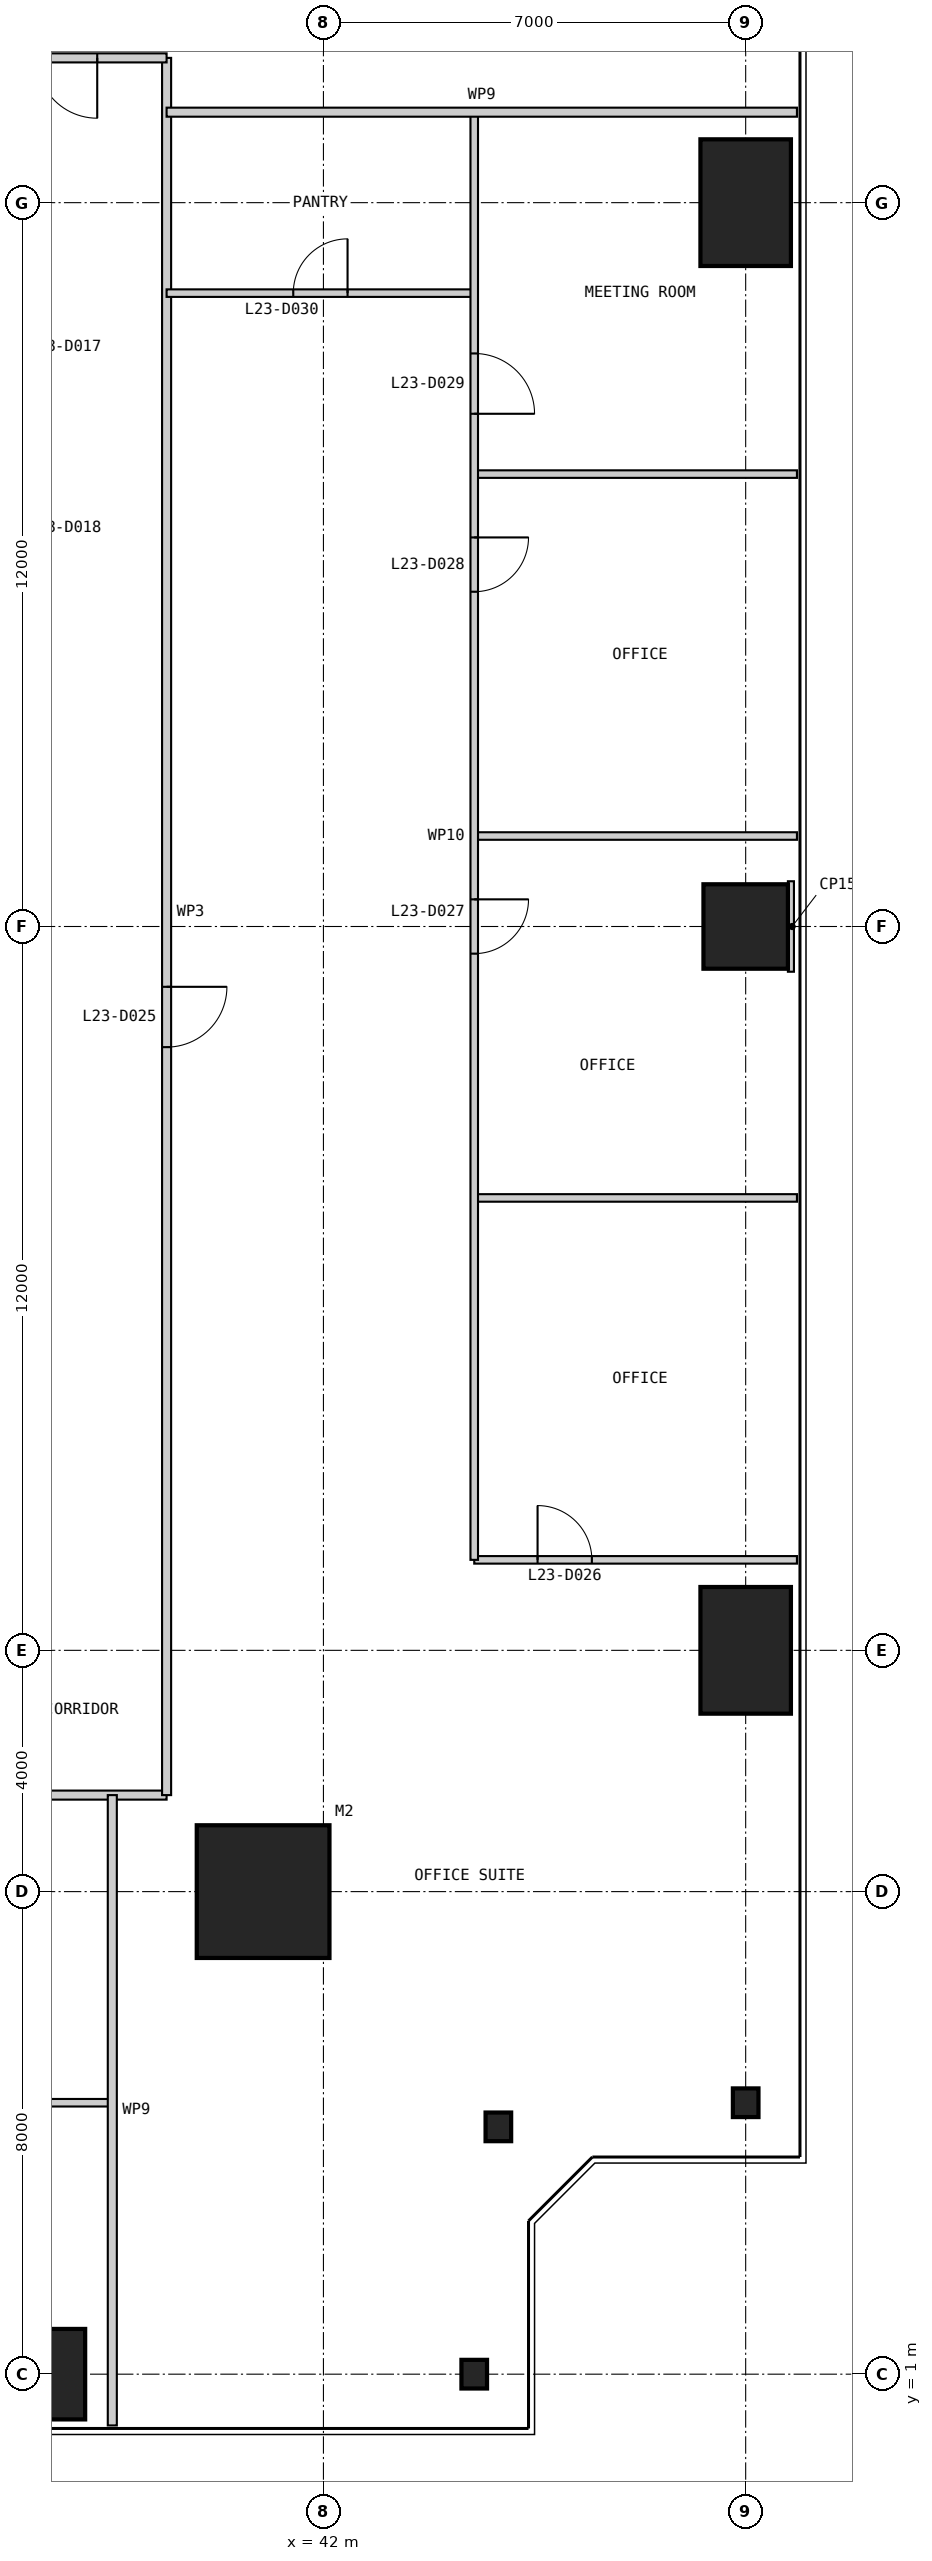
"""IFC4 building model, lengths in metres.
Left out: names, types, materials, properties, quantities, classifications, styles, units other than length and angle.
Written with IfcOpenShell. Run it as: python <this file> out.ifc"""

import sys

from ifc_helpers import new_model, si_unit, direction, frame, frame_2d, origin, origin_2d, place, context, subcontext, project, spatial, rectangle, i_section, extrude, element, fill, save


model = new_model("IFC4")
c1 = context("Model", 3, precision=1e-05, world=origin(), true_north=direction((0.0, 1.0)))
c2 = subcontext(c1, "Body", "Model", "MODEL_VIEW")
j1 = project(units=[si_unit("LENGTHUNIT", "METRE"), si_unit("PLANEANGLEUNIT", "RADIAN")], contexts=[c1])
p1 = place(None, origin())
s1 = spatial("IfcSite", under=j1, at=p1, CompositionType="ELEMENT")
p2 = place(p1, origin())
s2 = spatial("IfcBuilding", under=s1, at=p2, CompositionType="ELEMENT")
p3 = place(p2, frame((0.0, 0.0, 102.4)))
s3 = spatial("IfcBuildingStorey", under=s2, at=p3, CompositionType="ELEMENT", Elevation=102.4)
p4 = place(p3, frame((41.0, 9.0, 0.0), z_axis=(0.0, 0.0, 1.0), x_axis=(1.0, 0.0, 0.0)))
e1 = element("IfcColumn", 1, at=p4, inside=s3, PredefinedType="COLUMN", context=c2, shape_type="SweptSolid", body=[
    extrude(rectangle(XDim=2.2, YDim=2.2, at=origin_2d()), origin(), (0.0, 0.0, 1.0), 4.0),
])
p5 = place(p3, frame((37.0, 1.0, 0.0), z_axis=(0.0, 0.0, 1.0), x_axis=(1.0, 0.0, 0.0)))
e2 = element("IfcColumn", 2, at=p5, inside=s3, PredefinedType="COLUMN", context=c2, shape_type="SweptSolid", body=[
    extrude(rectangle(XDim=2.1, YDim=1.5, at=origin_2d()), origin(), (0.0, 0.0, 1.0), 4.0),
])
for number, where, z_axis, x_axis in (
    (3, (44.5, 1.0, 0.0), (0.0, 0.0, 1.0), (1.0, 0.0, 0.0)),
    (4, (44.9, 5.1, 0.0), (0.0, 0.0, 1.0), (1.0, 0.0, 0.0)),
    (5, (49.0, 5.5, 0.0), (0.0, 0.0, 1.0), (1.0, 0.0, 0.0)),
):
    element("IfcColumn", number, at=place(p3, frame(where, z_axis=z_axis, x_axis=x_axis)), inside=s3, PredefinedType="COLUMN", context=c2, shape_type="SweptSolid", body=[
        extrude(i_section(OverallWidth=0.424, OverallDepth=0.475, WebThickness=0.048, FlangeThickness=0.077, at=origin_2d()), origin(), (0.0, 0.0, 1.0), 4.0),
    ])
p6 = place(p3, frame((49.0, 13.0, 0.0), z_axis=(0.0, 0.0, 1.0), x_axis=(1.0, 0.0, 0.0)))
e6 = element("IfcColumn", 6, at=p6, inside=s3, PredefinedType="COLUMN", context=c2, shape_type="SweptSolid", body=[
    extrude(rectangle(XDim=1.5, YDim=2.1, at=origin_2d()), origin(), (0.0, 0.0, 1.0), 4.0),
])
p7 = place(p3, frame((49.0, 25.0, 0.0), z_axis=(0.0, 0.0, 1.0), x_axis=(1.0, 0.0, 0.0)))
e7 = element("IfcColumn", 7, at=p7, inside=s3, PredefinedType="COLUMN", context=c2, shape_type="SweptSolid", body=[
    extrude(rectangle(XDim=1.4, YDim=1.4, at=origin_2d()), origin(), (0.0, 0.0, 1.0), 4.0),
])
p8 = place(p3, frame((49.0, 37.0, 0.0), z_axis=(0.0, 0.0, 1.0), x_axis=(1.0, 0.0, 0.0)))
e8 = element("IfcColumn", 8, at=p8, inside=s3, PredefinedType="COLUMN", context=c2, shape_type="SweptSolid", body=[
    extrude(rectangle(XDim=1.5, YDim=2.1, at=origin_2d()), origin(), (0.0, 0.0, 1.0), 4.0),
])
p9 = place(p3, frame((11.5, 10.6, 0.0), z_axis=(0.0, 0.0, 1.0), x_axis=(1.0, 0.0, 0.0)))
e9 = element("IfcWall", 9, at=p9, inside=s3, PredefinedType="PARTITIONING", context=c2, shape_type="SweptSolid", body=[
    extrude(rectangle(XDim=27.9, YDim=0.15, at=frame_2d((13.95, 0.0))), origin(), (0.0, 0.0, 1.0), 3.85),
])
p10 = place(p9, frame((12.25, 0.0, 0.0)))
e10 = element("IfcOpeningElement", 10, at=p10, cuts=e9, PredefinedType="OPENING", context=c2, shape_type="SweptSolid", body=[
    extrude(rectangle(XDim=1.0, YDim=2.2, at=frame_2d((0.5, 1.1))), frame((0.0, 0.085, 0.0), z_axis=(0.0, -1.0, 0.0), x_axis=(1.0, 0.0, 0.0)), (0.0, 0.0, 1.0), 0.17),
])
p11 = place(p3, frame((14.5, 5.5, 0.0), z_axis=(0.0, 0.0, 1.0), x_axis=(1.0, 0.0, 0.0)))
e11 = element("IfcWall", 11, at=p11, inside=s3, PredefinedType="PARTITIONING", context=c2, shape_type="SweptSolid", body=[
    extrude(rectangle(XDim=24.0, YDim=0.125, at=frame_2d((12.0, 0.0))), origin(), (0.0, 0.0, 1.0), 3.85),
])
p12 = place(p11, frame((10.05, 0.0, 0.0)))
e12 = element("IfcOpeningElement", 12, at=p12, cuts=e11, PredefinedType="OPENING", context=c2, shape_type="SweptSolid", body=[
    extrude(rectangle(XDim=0.9, YDim=2.2, at=frame_2d((0.45, 1.1))), frame((0.0, 0.073, 0.0), z_axis=(0.0, -1.0, 0.0), x_axis=(1.0, 0.0, 0.0)), (0.0, 0.0, 1.0), 0.145),
])
p13 = place(p11, frame((16.05, 0.0, 0.0)))
e13 = element("IfcOpeningElement", 13, at=p13, cuts=e11, PredefinedType="OPENING", context=c2, shape_type="SweptSolid", body=[
    extrude(rectangle(XDim=0.9, YDim=2.2, at=frame_2d((0.45, 1.1))), frame((0.0, 0.073, 0.0), z_axis=(0.0, -1.0, 0.0), x_axis=(1.0, 0.0, 0.0)), (0.0, 0.0, 1.0), 0.145),
])
p14 = place(p11, frame((19.0, 0.0, 0.0)))
e14 = element("IfcOpeningElement", 14, at=p14, cuts=e11, PredefinedType="OPENING", context=c2, shape_type="SweptSolid", body=[
    extrude(rectangle(XDim=1.0, YDim=2.2, at=frame_2d((0.5, 1.1))), frame((0.0, 0.073, 0.0), z_axis=(0.0, -1.0, 0.0), x_axis=(1.0, 0.0, 0.0)), (0.0, 0.0, 1.0), 0.145),
])
p15 = place(p3, frame((39.4, 10.6, 0.0), z_axis=(0.0, 0.0, 1.0), x_axis=(0.0, 1.0, 0.0)))
e15 = element("IfcWall", 15, at=p15, inside=s3, PredefinedType="PARTITIONING", context=c2, shape_type="SweptSolid", body=[
    extrude(rectangle(XDim=28.8, YDim=0.15, at=frame_2d((14.4, 0.0))), origin(), (0.0, 0.0, 1.0), 3.85),
])
p16 = place(p15, frame((12.4, 0.0, 0.0)))
e16 = element("IfcOpeningElement", 16, at=p16, cuts=e15, PredefinedType="OPENING", context=c2, shape_type="SweptSolid", body=[
    extrude(rectangle(XDim=1.0, YDim=2.2, at=frame_2d((0.5, 1.1))), frame((0.0, 0.085, 0.0), z_axis=(0.0, -1.0, 0.0), x_axis=(1.0, 0.0, 0.0)), (0.0, 0.0, 1.0), 0.17),
])
p17 = place(p3, frame((38.5, 0.15, 0.0), z_axis=(0.0, 0.0, 1.0), x_axis=(0.0, 1.0, 0.0)))
e17 = element("IfcWall", 17, at=p17, inside=s3, PredefinedType="PARTITIONING", context=c2, shape_type="SweptSolid", body=[
    extrude(rectangle(XDim=10.45, YDim=0.15, at=frame_2d((5.225, 0.0))), origin(), (0.0, 0.0, 1.0), 3.85),
])
p18 = place(p3, frame((49.85, 14.5, 0.0), z_axis=(0.0, 0.0, 1.0), x_axis=(-1.0, 0.0, 0.0)))
e18 = element("IfcWall", 18, at=p18, inside=s3, PredefinedType="PARTITIONING", context=c2, shape_type="SweptSolid", body=[
    extrude(rectangle(XDim=5.35, YDim=0.125, at=frame_2d((2.675, 0.0))), origin(), (0.0, 0.0, 1.0), 3.85),
])
p19 = place(p18, frame((3.4, 0.0, 0.0)))
e19 = element("IfcOpeningElement", 19, at=p19, cuts=e18, PredefinedType="OPENING", context=c2, shape_type="SweptSolid", body=[
    extrude(rectangle(XDim=0.9, YDim=2.2, at=frame_2d((0.45, 1.1))), frame((0.0, 0.073, 0.0), z_axis=(0.0, -1.0, 0.0), x_axis=(1.0, 0.0, 0.0)), (0.0, 0.0, 1.0), 0.145),
])
for number, where, z_axis, x_axis in (
    (20, (49.85, 20.5, 0.0), (0.0, 0.0, 1.0), (-1.0, 0.0, 0.0)),
    (21, (49.85, 26.5, 0.0), (0.0, 0.0, 1.0), (-1.0, 0.0, 0.0)),
    (22, (49.85, 32.5, 0.0), (0.0, 0.0, 1.0), (-1.0, 0.0, 0.0)),
):
    element("IfcWall", number, at=place(p3, frame(where, z_axis=z_axis, x_axis=x_axis)), inside=s3, PredefinedType="PARTITIONING", context=c2, shape_type="SweptSolid", body=[
        extrude(rectangle(XDim=5.35, YDim=0.125, at=frame_2d((2.675, 0.0))), origin(), (0.0, 0.0, 1.0), 3.85),
    ])
p20 = place(p3, frame((44.5, 35.5, 0.0), z_axis=(0.0, 0.0, 1.0), x_axis=(-1.0, 0.0, 0.0)))
e23 = element("IfcWall", 23, at=p20, inside=s3, PredefinedType="PARTITIONING", context=c2, shape_type="SweptSolid", body=[
    extrude(rectangle(XDim=5.1, YDim=0.125, at=frame_2d((2.55, 0.0))), origin(), (0.0, 0.0, 1.0), 3.85),
])
p21 = place(p20, frame((2.1, 0.0, 0.0)))
e24 = element("IfcOpeningElement", 24, at=p21, cuts=e23, PredefinedType="OPENING", context=c2, shape_type="SweptSolid", body=[
    extrude(rectangle(XDim=0.9, YDim=2.2, at=frame_2d((0.45, 1.1))), frame((0.0, 0.073, 0.0), z_axis=(0.0, -1.0, 0.0), x_axis=(1.0, 0.0, 0.0)), (0.0, 0.0, 1.0), 0.145),
])
p22 = place(p3, frame((44.5, 14.5, 0.0), z_axis=(0.0, 0.0, 1.0), x_axis=(0.0, 1.0, 0.0)))
e25 = element("IfcWall", 25, at=p22, inside=s3, PredefinedType="PARTITIONING", context=c2, shape_type="SweptSolid", body=[
    extrude(rectangle(XDim=24.0, YDim=0.125, at=frame_2d((12.0, 0.0))), origin(), (0.0, 0.0, 1.0), 3.85),
])
p23 = place(p22, frame((10.05, 0.0, 0.0)))
e26 = element("IfcOpeningElement", 26, at=p23, cuts=e25, PredefinedType="OPENING", context=c2, shape_type="SweptSolid", body=[
    extrude(rectangle(XDim=0.9, YDim=2.2, at=frame_2d((0.45, 1.1))), frame((0.0, 0.073, 0.0), z_axis=(0.0, -1.0, 0.0), x_axis=(1.0, 0.0, 0.0)), (0.0, 0.0, 1.0), 0.145),
])
p24 = place(p22, frame((16.05, 0.0, 0.0)))
e27 = element("IfcOpeningElement", 27, at=p24, cuts=e25, PredefinedType="OPENING", context=c2, shape_type="SweptSolid", body=[
    extrude(rectangle(XDim=0.9, YDim=2.2, at=frame_2d((0.45, 1.1))), frame((0.0, 0.073, 0.0), z_axis=(0.0, -1.0, 0.0), x_axis=(1.0, 0.0, 0.0)), (0.0, 0.0, 1.0), 0.145),
])
p25 = place(p22, frame((19.0, 0.0, 0.0)))
e28 = element("IfcOpeningElement", 28, at=p25, cuts=e25, PredefinedType="OPENING", context=c2, shape_type="SweptSolid", body=[
    extrude(rectangle(XDim=1.0, YDim=2.2, at=frame_2d((0.5, 1.1))), frame((0.0, 0.073, 0.0), z_axis=(0.0, -1.0, 0.0), x_axis=(1.0, 0.0, 0.0)), (0.0, 0.0, 1.0), 0.145),
])
p26 = place(p3, frame((39.4, 39.4, 0.0), z_axis=(0.0, 0.0, 1.0), x_axis=(-1.0, 0.0, 0.0)))
e29 = element("IfcWall", 29, at=p26, inside=s3, PredefinedType="PARTITIONING", context=c2, shape_type="SweptSolid", body=[
    extrude(rectangle(XDim=27.9, YDim=0.15, at=frame_2d((13.95, 0.0))), origin(), (0.0, 0.0, 1.0), 3.85),
])
p27 = place(p26, frame((4.15, 0.0, 0.0)))
e30 = element("IfcOpeningElement", 30, at=p27, cuts=e29, PredefinedType="OPENING", context=c2, shape_type="SweptSolid", body=[
    extrude(rectangle(XDim=1.0, YDim=2.2, at=frame_2d((0.5, 1.1))), frame((0.0, 0.085, 0.0), z_axis=(0.0, -1.0, 0.0), x_axis=(1.0, 0.0, 0.0)), (0.0, 0.0, 1.0), 0.17),
])
p28 = place(p26, frame((25.15, 0.0, 0.0)))
e31 = element("IfcOpeningElement", 31, at=p28, cuts=e29, PredefinedType="OPENING", context=c2, shape_type="SweptSolid", body=[
    extrude(rectangle(XDim=1.0, YDim=2.2, at=frame_2d((0.5, 1.1))), frame((0.0, 0.085, 0.0), z_axis=(0.0, -1.0, 0.0), x_axis=(1.0, 0.0, 0.0)), (0.0, 0.0, 1.0), 0.17),
])
p29 = place(p26, frame((1.15, 0.0, 0.0)))
e32 = element("IfcOpeningElement", 32, at=p29, cuts=e29, PredefinedType="OPENING", context=c2, shape_type="SweptSolid", body=[
    extrude(rectangle(XDim=1.0, YDim=2.2, at=frame_2d((0.5, 1.1))), frame((0.0, 0.085, 0.0), z_axis=(0.0, -1.0, 0.0), x_axis=(1.0, 0.0, 0.0)), (0.0, 0.0, 1.0), 0.17),
])
p30 = place(p3, frame((49.85, 38.5, 0.0), z_axis=(0.0, 0.0, 1.0), x_axis=(-1.0, 0.0, 0.0)))
e33 = element("IfcWall", 33, at=p30, inside=s3, PredefinedType="PARTITIONING", context=c2, shape_type="SweptSolid", body=[
    extrude(rectangle(XDim=10.45, YDim=0.15, at=frame_2d((5.225, 0.0))), origin(), (0.0, 0.0, 1.0), 3.85),
])
p31 = place(p3, frame((49.8, 25.0, 0.0), z_axis=(0.0, 0.0, 1.0), x_axis=(-1.0, 0.0, 0.0)))
e34 = element("IfcWall", 34, at=p31, inside=s3, PredefinedType="PARTITIONING", context=c2, shape_type="SweptSolid", body=[
    extrude(rectangle(XDim=0.1, YDim=1.5, at=frame_2d((0.05, 0.0))), origin(), (0.0, 0.0, 1.0), 3.85),
])
p32 = place(p16, frame((1.0, 0.0, 0.0), z_axis=(0.0, 0.0, 1.0), x_axis=(-1.0, 0.0, 0.0)))
e35 = element("IfcDoor", 35, at=p32, inside=s3, OperationType="SINGLE_SWING_LEFT", PredefinedType="DOOR", context=c2, shape_type="SweptSolid", body=[
    extrude(rectangle(XDim=1.0, YDim=2.2, at=frame_2d((0.5, 1.1))), frame((0.0, 0.025, 0.0), z_axis=(0.0, -1.0, 0.0), x_axis=(1.0, 0.0, 0.0)), (0.0, 0.0, 1.0), 0.05),
])
fill(e16, e35)
p33 = place(p19, frame((0.9, 0.0, 0.0), z_axis=(0.0, 0.0, 1.0), x_axis=(-1.0, 0.0, 0.0)))
e36 = element("IfcDoor", 36, at=p33, inside=s3, OperationType="SINGLE_SWING_LEFT", PredefinedType="DOOR", context=c2, shape_type="SweptSolid", body=[
    extrude(rectangle(XDim=0.9, YDim=2.2, at=frame_2d((0.45, 1.1))), frame((0.0, 0.025, 0.0), z_axis=(0.0, -1.0, 0.0), x_axis=(1.0, 0.0, 0.0)), (0.0, 0.0, 1.0), 0.05),
])
fill(e19, e36)
p34 = place(p23, frame((0.9, 0.0, 0.0), z_axis=(0.0, 0.0, 1.0), x_axis=(-1.0, 0.0, 0.0)))
e37 = element("IfcDoor", 37, at=p34, inside=s3, OperationType="SINGLE_SWING_LEFT", PredefinedType="DOOR", context=c2, shape_type="SweptSolid", body=[
    extrude(rectangle(XDim=0.9, YDim=2.2, at=frame_2d((0.45, 1.1))), frame((0.0, 0.025, 0.0), z_axis=(0.0, -1.0, 0.0), x_axis=(1.0, 0.0, 0.0)), (0.0, 0.0, 1.0), 0.05),
])
fill(e26, e37)
p35 = place(p24, frame((0.9, 0.0, 0.0), z_axis=(0.0, 0.0, 1.0), x_axis=(-1.0, 0.0, 0.0)))
e38 = element("IfcDoor", 38, at=p35, inside=s3, OperationType="SINGLE_SWING_LEFT", PredefinedType="DOOR", context=c2, shape_type="SweptSolid", body=[
    extrude(rectangle(XDim=0.9, YDim=2.2, at=frame_2d((0.45, 1.1))), frame((0.0, 0.025, 0.0), z_axis=(0.0, -1.0, 0.0), x_axis=(1.0, 0.0, 0.0)), (0.0, 0.0, 1.0), 0.05),
])
fill(e27, e38)
p36 = place(p25, frame((1.0, 0.0, 0.0), z_axis=(0.0, 0.0, 1.0), x_axis=(-1.0, 0.0, 0.0)))
e39 = element("IfcDoor", 39, at=p36, inside=s3, OperationType="SINGLE_SWING_RIGHT", PredefinedType="DOOR", context=c2, shape_type="SweptSolid", body=[
    extrude(rectangle(XDim=1.0, YDim=2.2, at=frame_2d((0.5, 1.1))), frame((0.0, 0.025, 0.0), z_axis=(0.0, -1.0, 0.0), x_axis=(1.0, 0.0, 0.0)), (0.0, 0.0, 1.0), 0.05),
])
fill(e28, e39)
p37 = place(p21, frame((0.9, 0.0, 0.0), z_axis=(0.0, 0.0, 1.0), x_axis=(-1.0, 0.0, 0.0)))
e40 = element("IfcDoor", 40, at=p37, inside=s3, OperationType="SINGLE_SWING_RIGHT", PredefinedType="DOOR", context=c2, shape_type="SweptSolid", body=[
    extrude(rectangle(XDim=0.9, YDim=2.2, at=frame_2d((0.45, 1.1))), frame((0.0, 0.025, 0.0), z_axis=(0.0, -1.0, 0.0), x_axis=(1.0, 0.0, 0.0)), (0.0, 0.0, 1.0), 0.05),
])
fill(e24, e40)
p38 = place(p29, origin())
e41 = element("IfcDoor", 41, at=p38, inside=s3, OperationType="SINGLE_SWING_LEFT", PredefinedType="DOOR", context=c2, shape_type="SweptSolid", body=[
    extrude(rectangle(XDim=1.0, YDim=2.2, at=frame_2d((0.5, 1.1))), frame((0.0, 0.025, 0.0), z_axis=(0.0, -1.0, 0.0), x_axis=(1.0, 0.0, 0.0)), (0.0, 0.0, 1.0), 0.05),
])
fill(e32, e41)
save(model, sys.argv[1])
